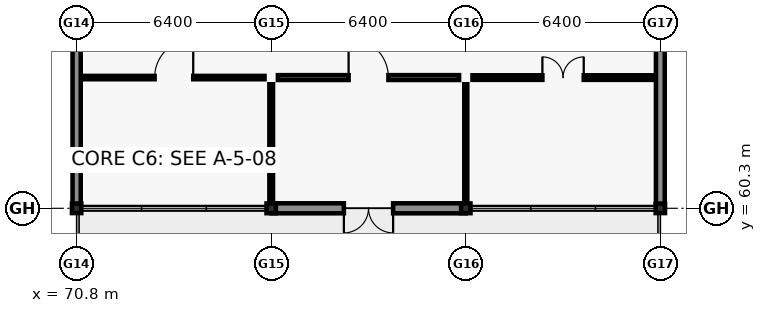
"""IFC4 building model, lengths in metres.
Left out: names, types, materials, properties, quantities, classifications, styles, units other than length and angle.
Written with IfcOpenShell. Run it as: python <this file> out.ifc"""

import sys

from ifc_helpers import new_model, si_unit, direction, frame, frame_2d, origin, origin_2d, place, context, subcontext, project, spatial, rectangle, i_section, extrude, element, fill, save


model = new_model("IFC4")
c1 = context("Model", 3, precision=1e-05, world=origin(), true_north=direction((0.0, 1.0)))
c2 = subcontext(c1, "Body", "Model", "MODEL_VIEW")
j1 = project(units=[si_unit("LENGTHUNIT", "METRE"), si_unit("PLANEANGLEUNIT", "RADIAN")], contexts=[c1])
p1 = place(None, origin())
s1 = spatial("IfcSite", under=j1, at=p1, CompositionType="ELEMENT")
p2 = place(p1, origin())
s2 = spatial("IfcBuilding", under=s1, at=p2, CompositionType="ELEMENT")
p3 = place(p2, frame((0.0, 0.0, 13.5)))
s3 = spatial("IfcBuildingStorey", under=s2, at=p3, CompositionType="ELEMENT", Elevation=13.5)
p4 = place(p3, frame((70.8, 60.3, 0.0), z_axis=(0.0, 0.0, 1.0), x_axis=(1.0, 0.0, 0.0)))
e1 = element("IfcColumn", 1, at=p4, inside=s3, PredefinedType="COLUMN", context=c2, shape_type="SweptSolid", body=[
    extrude(i_section(OverallWidth=0.307, OverallDepth=0.315, WebThickness=0.012, FlangeThickness=0.019, FilletRadius=0.017, at=origin_2d()), origin(), (0.0, 0.0, 1.0), 3.9),
])
for number, where, z_axis, x_axis in (
    (2, (77.2, 60.3, 0.0), (0.0, 0.0, 1.0), (1.0, 0.0, 0.0)),
    (3, (83.6, 60.3, 0.0), (0.0, 0.0, 1.0), (1.0, 0.0, 0.0)),
):
    element("IfcColumn", number, at=place(p3, frame(where, z_axis=z_axis, x_axis=x_axis)), inside=s3, PredefinedType="COLUMN", context=c2, shape_type="SweptSolid", body=[
        extrude(i_section(OverallWidth=0.309, OverallDepth=0.321, WebThickness=0.014, FlangeThickness=0.022, FilletRadius=0.017, at=origin_2d()), origin(), (0.0, 0.0, 1.0), 3.9),
    ])
p5 = place(p3, frame((90.0, 60.3, 0.0), z_axis=(0.0, 0.0, 1.0), x_axis=(1.0, 0.0, 0.0)))
e4 = element("IfcColumn", 4, at=p5, inside=s3, PredefinedType="COLUMN", context=c2, shape_type="SweptSolid", body=[
    extrude(i_section(OverallWidth=0.307, OverallDepth=0.315, WebThickness=0.012, FlangeThickness=0.019, FilletRadius=0.017, at=origin_2d()), origin(), (0.0, 0.0, 1.0), 3.9),
])
p6 = place(p3, frame((83.595, 60.3, 0.0), z_axis=(0.0, 0.0, 1.0), x_axis=(-1.0, 0.0, 0.0)))
e5 = element("IfcWall", 5, at=p6, inside=s3, PredefinedType="SOLIDWALL", context=c2, shape_type="SweptSolid", body=[
    extrude(rectangle(XDim=6.39, YDim=0.33, at=frame_2d((3.195, 0.0))), origin(), (0.0, 0.0, 1.0), 3.02),
])
p7 = place(p6, frame((2.385, 0.0, 0.0)))
e6 = element("IfcOpeningElement", 6, at=p7, cuts=e5, PredefinedType="OPENING", context=c2, shape_type="SweptSolid", body=[
    extrude(rectangle(XDim=1.62, YDim=2.18, at=frame_2d((0.81, 1.09))), frame((0.0, 0.175, 0.0), z_axis=(0.0, -1.0, 0.0), x_axis=(1.0, 0.0, 0.0)), (0.0, 0.0, 1.0), 0.35),
])
p8 = place(p3, frame((70.8, 60.305, 0.0), z_axis=(0.0, 0.0, 1.0), x_axis=(0.0, 1.0, 0.0)))
e7 = element("IfcWall", 7, at=p8, inside=s3, PredefinedType="SOLIDWALL", context=c2, shape_type="SweptSolid", body=[
    extrude(rectangle(XDim=6.89, YDim=0.27, at=frame_2d((3.445, 0.0))), origin(), (0.0, 0.0, 1.0), 3.02),
])
p9 = place(p3, frame((90.0, 67.195, 0.0), z_axis=(0.0, 0.0, 1.0), x_axis=(0.0, -1.0, 0.0)))
e8 = element("IfcWall", 8, at=p9, inside=s3, PredefinedType="SOLIDWALL", context=c2, shape_type="SweptSolid", body=[
    extrude(rectangle(XDim=6.89, YDim=0.29, at=frame_2d((3.445, 0.0))), origin(), (0.0, 0.0, 1.0), 3.02),
])
p10 = place(p3, frame((77.2, 60.52, 0.0), z_axis=(0.0, 0.0, 1.0), x_axis=(0.0, 1.0, 0.0)))
e9 = element("IfcWall", 9, at=p10, inside=s3, PredefinedType="PARTITIONING", context=c2, shape_type="SweptSolid", body=[
    extrude(rectangle(XDim=3.86, YDim=0.12, at=frame_2d((1.93, 0.0))), origin(), (0.0, 0.0, 1.0), 3.0),
])
p11 = place(p3, frame((71.02, 64.6, 0.0), z_axis=(0.0, 0.0, 1.0), x_axis=(1.0, 0.0, 0.0)))
e10 = element("IfcWall", 10, at=p11, inside=s3, PredefinedType="PARTITIONING", context=c2, shape_type="SweptSolid", body=[
    extrude(rectangle(XDim=5.96, YDim=0.11, at=frame_2d((2.98, 0.0))), origin(), (0.0, 0.0, 1.0), 3.0),
])
p12 = place(p11, frame((2.345, 0.0, 0.0)))
e11 = element("IfcOpeningElement", 11, at=p12, cuts=e10, PredefinedType="OPENING", context=c2, shape_type="SweptSolid", body=[
    extrude(rectangle(XDim=1.27, YDim=2.1, at=frame_2d((0.635, 1.05))), frame((0.0, 0.065, 0.0), z_axis=(0.0, -1.0, 0.0), x_axis=(1.0, 0.0, 0.0)), (0.0, 0.0, 1.0), 0.13),
])
p13 = place(p3, frame((83.6, 60.52, 0.0), z_axis=(0.0, 0.0, 1.0), x_axis=(0.0, 1.0, 0.0)))
e12 = element("IfcWall", 12, at=p13, inside=s3, PredefinedType="PARTITIONING", context=c2, shape_type="SweptSolid", body=[
    extrude(rectangle(XDim=3.86, YDim=0.1, at=frame_2d((1.93, 0.0))), origin(), (0.0, 0.0, 1.0), 3.0),
])
p14 = place(p3, frame((77.42, 64.6, 0.0), z_axis=(0.0, 0.0, 1.0), x_axis=(1.0, 0.0, 0.0)))
e13 = element("IfcWall", 13, at=p14, inside=s3, PredefinedType="PARTITIONING", context=c2, shape_type="SweptSolid", body=[
    extrude(rectangle(XDim=5.96, YDim=0.16, at=frame_2d((2.98, 0.0))), origin(), (0.0, 0.0, 1.0), 3.0),
])
p15 = place(p14, frame((2.325, 0.0, 0.0)))
e14 = element("IfcOpeningElement", 14, at=p15, cuts=e13, PredefinedType="OPENING", context=c2, shape_type="SweptSolid", body=[
    extrude(rectangle(XDim=1.31, YDim=2.14, at=frame_2d((0.655, 1.07))), frame((0.0, 0.09, 0.0), z_axis=(0.0, -1.0, 0.0), x_axis=(1.0, 0.0, 0.0)), (0.0, 0.0, 1.0), 0.18),
])
p16 = place(p3, frame((83.82, 64.6, 0.0), z_axis=(0.0, 0.0, 1.0), x_axis=(1.0, 0.0, 0.0)))
e15 = element("IfcWall", 15, at=p16, inside=s3, PredefinedType="PARTITIONING", context=c2, shape_type="SweptSolid", body=[
    extrude(rectangle(XDim=5.96, YDim=0.15, at=frame_2d((2.98, 0.0))), origin(), (0.0, 0.0, 1.0), 3.0),
])
p17 = place(p16, frame((2.3, 0.0, 0.0)))
e16 = element("IfcOpeningElement", 16, at=p17, cuts=e15, PredefinedType="OPENING", context=c2, shape_type="SweptSolid", body=[
    extrude(rectangle(XDim=1.36, YDim=2.15, at=frame_2d((0.68, 1.075))), frame((0.0, 0.085, 0.0), z_axis=(0.0, -1.0, 0.0), x_axis=(1.0, 0.0, 0.0)), (0.0, 0.0, 1.0), 0.17),
])
p18 = place(p7, origin())
e17 = element("IfcDoor", 17, at=p18, inside=s3, OperationType="DOUBLE_DOOR_SINGLE_SWING", PredefinedType="DOOR", context=c2, shape_type="SweptSolid", body=[
    extrude(rectangle(XDim=1.62, YDim=2.18, at=frame_2d((0.81, 1.09))), frame((0.0, 0.025, 0.0), z_axis=(0.0, -1.0, 0.0), x_axis=(1.0, 0.0, 0.0)), (0.0, 0.0, 1.0), 0.05),
])
fill(e6, e17)
p19 = place(p12, origin())
e18 = element("IfcDoor", 18, at=p19, inside=s3, OperationType="SINGLE_SWING_RIGHT", PredefinedType="DOOR", context=c2, shape_type="SweptSolid", body=[
    extrude(rectangle(XDim=1.27, YDim=2.1, at=frame_2d((0.635, 1.05))), frame((0.0, 0.025, 0.0), z_axis=(0.0, -1.0, 0.0), x_axis=(1.0, 0.0, 0.0)), (0.0, 0.0, 1.0), 0.05),
])
fill(e11, e18)
p20 = place(p15, origin())
e19 = element("IfcDoor", 19, at=p20, inside=s3, OperationType="SINGLE_SWING_LEFT", PredefinedType="DOOR", context=c2, shape_type="SweptSolid", body=[
    extrude(rectangle(XDim=1.31, YDim=2.14, at=frame_2d((0.655, 1.07))), frame((0.0, 0.025, 0.0), z_axis=(0.0, -1.0, 0.0), x_axis=(1.0, 0.0, 0.0)), (0.0, 0.0, 1.0), 0.05),
])
fill(e14, e19)
p21 = place(p17, origin())
e20 = element("IfcDoor", 20, at=p21, inside=s3, OperationType="DOUBLE_DOOR_SINGLE_SWING", PredefinedType="DOOR", context=c2, shape_type="SweptSolid", body=[
    extrude(rectangle(XDim=1.36, YDim=2.15, at=frame_2d((0.68, 1.075))), frame((0.0, 0.025, 0.0), z_axis=(0.0, -1.0, 0.0), x_axis=(1.0, 0.0, 0.0)), (0.0, 0.0, 1.0), 0.05),
])
fill(e16, e20)
save(model, sys.argv[1])
